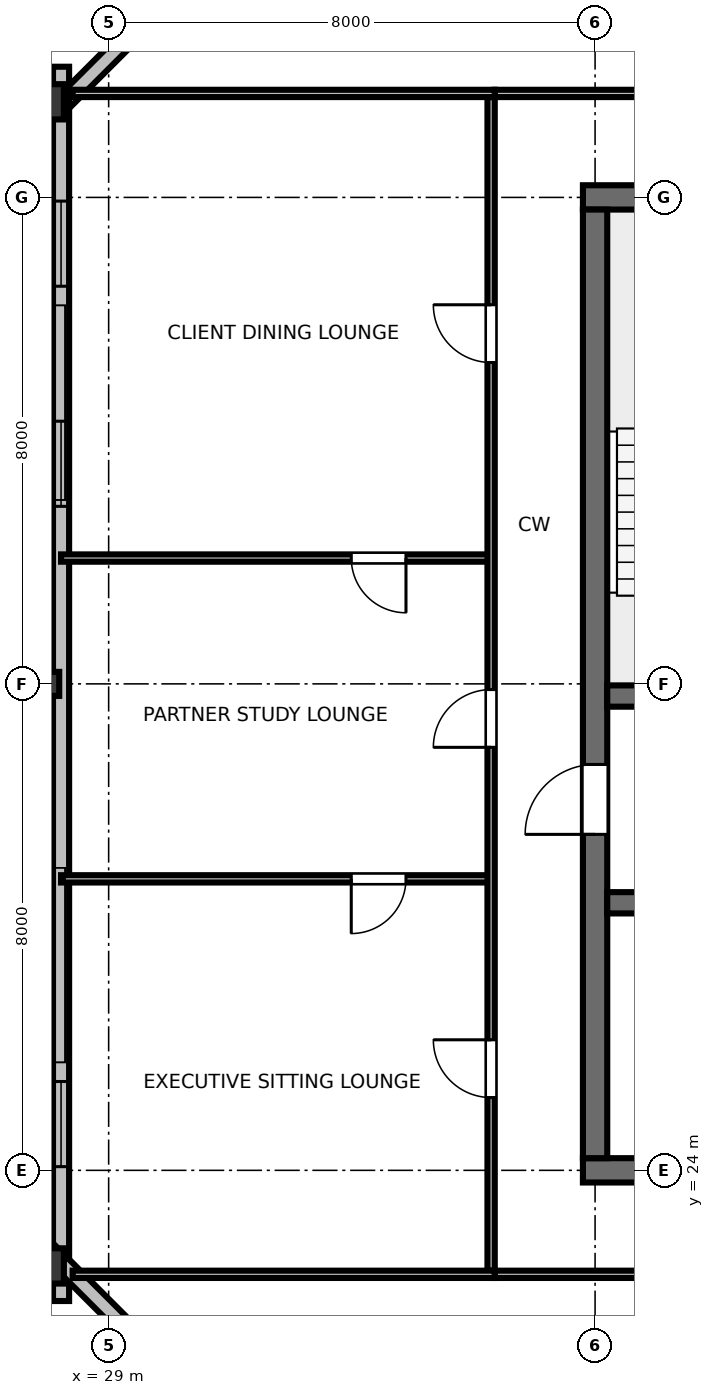
"""IFC4 building model, lengths in metres.
Left out: names, types, materials, properties, quantities, classifications, styles, units other than length and angle.
Written with IfcOpenShell. Run it as: python <this file> out.ifc"""

import sys

from ifc_helpers import new_model, si_unit, direction, frame, frame_2d, origin, origin_2d, place, context, subcontext, project, spatial, rectangle, hollow_rectangle, i_section, extrude, element, fill, save


model = new_model("IFC4")
c1 = context("Model", 3, precision=1e-05, world=origin(), true_north=direction((0.0, 1.0)))
c2 = subcontext(c1, "Body", "Model", "MODEL_VIEW")
j1 = project(units=[si_unit("LENGTHUNIT", "METRE"), si_unit("PLANEANGLEUNIT", "RADIAN")], contexts=[c1])
p1 = place(None, origin())
s1 = spatial("IfcSite", under=j1, at=p1, CompositionType="ELEMENT")
p2 = place(p1, origin())
s2 = spatial("IfcBuilding", under=s1, at=p2, CompositionType="ELEMENT")
p3 = place(p2, frame((0.0, 0.0, 268.2)))
s3 = spatial("IfcBuildingStorey", under=s2, at=p3, CompositionType="ELEMENT", Elevation=268.2)
p4 = place(p3, frame((36.8, 24.0, 0.0), z_axis=(0.0, 0.0, 1.0), x_axis=(1.0, 0.0, 0.0)))
e1 = element("IfcWall", 1, at=p4, inside=s3, PredefinedType="SHEAR", context=c2, shape_type="SweptSolid", body=[
    extrude(rectangle(XDim=18.4, YDim=0.4, at=frame_2d((9.2, 0.0))), origin(), (0.0, 0.0, 1.0), 3.36),
])
p5 = place(p4, frame((13.4, 0.0, 0.0)))
e2 = element("IfcOpeningElement", 2, at=p5, cuts=e1, PredefinedType="OPENING", context=c2, shape_type="SweptSolid", body=[
    extrude(rectangle(XDim=1.6, YDim=2.15, at=frame_2d((0.8, 1.075))), frame((0.0, 0.21, 0.0), z_axis=(0.0, -1.0, 0.0), x_axis=(1.0, 0.0, 0.0)), (0.0, 0.0, 1.0), 0.42),
])
p6 = place(p3, frame((36.8, 40.0, 0.0), z_axis=(0.0, 0.0, 1.0), x_axis=(1.0, 0.0, 0.0)))
e3 = element("IfcWall", 3, at=p6, inside=s3, PredefinedType="SHEAR", context=c2, shape_type="SweptSolid", body=[
    extrude(rectangle(XDim=18.4, YDim=0.4, at=frame_2d((9.2, 0.0))), origin(), (0.0, 0.0, 1.0), 3.36),
])
p7 = place(p6, frame((10.5, 0.0, 0.0)))
e4 = element("IfcOpeningElement", 4, at=p7, cuts=e3, PredefinedType="OPENING", context=c2, shape_type="SweptSolid", body=[
    extrude(rectangle(XDim=1.0, YDim=2.15, at=frame_2d((0.5, 1.075))), frame((0.0, 0.21, 0.0), z_axis=(0.0, -1.0, 0.0), x_axis=(1.0, 0.0, 0.0)), (0.0, 0.0, 1.0), 0.42),
])
p8 = place(p3, frame((37.0, 24.2, 0.0), z_axis=(0.0, 0.0, 1.0), x_axis=(0.0, 1.0, 0.0)))
e5 = element("IfcWall", 5, at=p8, inside=s3, PredefinedType="SHEAR", context=c2, shape_type="SweptSolid", body=[
    extrude(rectangle(XDim=15.6, YDim=0.4, at=frame_2d((7.8, 0.0))), origin(), (0.0, 0.0, 1.0), 3.36),
])
p9 = place(p8, frame((5.325, 0.0, 0.0)))
e6 = element("IfcOpeningElement", 6, at=p9, cuts=e5, PredefinedType="OPENING", context=c2, shape_type="SweptSolid", body=[
    extrude(rectangle(XDim=1.15, YDim=2.15, at=frame_2d((0.575, 1.075))), frame((0.0, 0.21, 0.0), z_axis=(0.0, -1.0, 0.0), x_axis=(1.0, 0.0, 0.0)), (0.0, 0.0, 1.0), 0.42),
])
p10 = place(p3, frame((37.2, 31.8, 0.0), z_axis=(0.0, 0.0, 1.0), x_axis=(1.0, 0.0, 0.0)))
e7 = element("IfcWall", 7, at=p10, inside=s3, PredefinedType="SHEAR", context=c2, shape_type="SweptSolid", body=[
    extrude(rectangle(XDim=17.6, YDim=0.35, at=frame_2d((8.8, 0.0))), origin(), (0.0, 0.0, 1.0), 3.36),
])
p11 = place(p10, frame((0.85, 0.0, 0.0)))
e8 = element("IfcOpeningElement", 8, at=p11, cuts=e7, PredefinedType="OPENING", context=c2, shape_type="SweptSolid", body=[
    extrude(rectangle(XDim=1.1, YDim=2.15, at=frame_2d((0.55, 1.075))), frame((0.0, 0.185, 0.0), z_axis=(0.0, -1.0, 0.0), x_axis=(1.0, 0.0, 0.0)), (0.0, 0.0, 1.0), 0.37),
])
p12 = place(p10, frame((14.75, 0.0, 0.0)))
e9 = element("IfcOpeningElement", 9, at=p12, cuts=e7, PredefinedType="OPENING", context=c2, shape_type="SweptSolid", body=[
    extrude(rectangle(XDim=1.1, YDim=2.15, at=frame_2d((0.55, 1.075))), frame((0.0, 0.185, 0.0), z_axis=(0.0, -1.0, 0.0), x_axis=(1.0, 0.0, 0.0)), (0.0, 0.0, 1.0), 0.37),
])
p13 = place(p3, frame((37.2, 28.4, 0.0), z_axis=(0.0, 0.0, 1.0), x_axis=(1.0, 0.0, 0.0)))
e10 = element("IfcWall", 10, at=p13, inside=s3, PredefinedType="SHEAR", context=c2, shape_type="SweptSolid", body=[
    extrude(rectangle(XDim=17.6, YDim=0.35, at=frame_2d((8.8, 0.0))), origin(), (0.0, 0.0, 1.0), 3.36),
])
p14 = place(p3, frame((27.914, 41.572, 0.0), z_axis=(0.177666210098, -0.155370015085, 0.971748360535), x_axis=(-0.731494530151, 0.639695731236, 0.236019329289)))
e11 = element("IfcColumn", 11, at=p14, inside=s3, PredefinedType="COLUMN", context=c2, shape_type="SweptSolid", body=[
    extrude(hollow_rectangle(XDim=0.58, YDim=0.7, WallThickness=0.032, at=origin_2d()), origin(), (0.0, 0.0, 1.0), 3.471),
])
p15 = place(p3, frame((27.997, 32.0, 0.0), z_axis=(0.178954370443, 0.0, 0.98385737447), x_axis=(-0.98385737447, 0.0, 0.178954370443)))
e12 = element("IfcColumn", 12, at=p15, inside=s3, PredefinedType="COLUMN", context=c2, shape_type="SweptSolid", body=[
    extrude(i_section(OverallWidth=0.395, OverallDepth=0.38, WebThickness=0.019, FlangeThickness=0.03, FilletRadius=0.025, at=origin_2d()), origin(), (0.0, 0.0, 1.0), 3.428),
])
p16 = place(p3, frame((27.914, 22.428, 0.0), z_axis=(0.177666210098, 0.155370015085, 0.971748360535), x_axis=(-0.731494530151, -0.639695731236, 0.236019329289)))
e13 = element("IfcColumn", 13, at=p16, inside=s3, PredefinedType="COLUMN", context=c2, shape_type="SweptSolid", body=[
    extrude(hollow_rectangle(XDim=0.58, YDim=0.7, WallThickness=0.032, at=origin_2d()), origin(), (0.0, 0.0, 1.0), 3.471),
])
p17 = place(p3, frame((35.53, 48.832, 0.0), z_axis=(0.0, 0.0, 1.0), x_axis=(-0.707106781187, -0.707106781187, 0.0)))
e14 = element("IfcWall", 14, at=p17, inside=s3, PredefinedType="STANDARD", context=c2, shape_type="SweptSolid", body=[
    extrude(rectangle(XDim=10.971, YDim=0.265, at=frame_2d((5.485, 0.0))), origin(), (0.0, 0.0, 1.0), 3.375),
])
p18 = place(p3, frame((28.217, 42.149, 0.0), z_axis=(0.0, 0.0, 1.0), x_axis=(0.0, -1.0, 0.0)))
e15 = element("IfcWall", 15, at=p18, inside=s3, PredefinedType="STANDARD", context=c2, shape_type="SweptSolid", body=[
    extrude(rectangle(XDim=20.298, YDim=0.265, at=frame_2d((10.149, 0.0))), origin(), (0.0, 0.0, 1.0), 2.832),
])
p19 = place(p18, frame((2.21, 0.0, 0.85)))
e16 = element("IfcOpeningElement", 16, at=p19, cuts=e15, PredefinedType="OPENING", context=c2, shape_type="SweptSolid", body=[
    extrude(rectangle(XDim=1.4, YDim=1.2, at=frame_2d((0.7, 0.6))), frame((0.0, 0.142, 0.0), z_axis=(0.0, -1.0, 0.0), x_axis=(1.0, 0.0, 0.0)), (0.0, 0.0, 1.0), 0.285),
])
p20 = place(p18, frame((5.83, 0.0, 0.85)))
e17 = element("IfcOpeningElement", 17, at=p20, cuts=e15, PredefinedType="OPENING", context=c2, shape_type="SweptSolid", body=[
    extrude(rectangle(XDim=1.4, YDim=1.2, at=frame_2d((0.7, 0.6))), frame((0.0, 0.142, 0.0), z_axis=(0.0, -1.0, 0.0), x_axis=(1.0, 0.0, 0.0)), (0.0, 0.0, 1.0), 0.285),
])
p21 = place(p18, frame((16.688, 0.0, 0.85)))
e18 = element("IfcOpeningElement", 18, at=p21, cuts=e15, PredefinedType="OPENING", context=c2, shape_type="SweptSolid", body=[
    extrude(rectangle(XDim=1.4, YDim=1.2, at=frame_2d((0.7, 0.6))), frame((0.0, 0.142, 0.0), z_axis=(0.0, -1.0, 0.0), x_axis=(1.0, 0.0, 0.0)), (0.0, 0.0, 1.0), 0.285),
])
p22 = place(p3, frame((27.772, 22.925, 0.0), z_axis=(0.0, 0.0, 1.0), x_axis=(0.707106781187, -0.707106781187, 0.0)))
e19 = element("IfcWall", 19, at=p22, inside=s3, PredefinedType="STANDARD", context=c2, shape_type="SweptSolid", body=[
    extrude(rectangle(XDim=10.971, YDim=0.265, at=frame_2d((5.485, 0.0))), origin(), (0.0, 0.0, 1.0), 3.375),
])
p23 = place(p3, frame((35.35, 22.29, 0.0), z_axis=(0.0, 0.0, 1.0), x_axis=(1.0, 0.0, 0.0)))
e20 = element("IfcWall", 20, at=p23, inside=s3, PredefinedType="PARTITIONING", context=c2, shape_type="SweptSolid", body=[
    extrude(rectangle(XDim=21.3, YDim=0.12, at=frame_2d((10.65, 0.0))), origin(), (0.0, 0.0, 1.0), 2.655),
])
p24 = place(p23, frame((4.425, 0.0, 0.0)))
e21 = element("IfcOpeningElement", 21, at=p24, cuts=e20, PredefinedType="OPENING", context=c2, shape_type="SweptSolid", body=[
    extrude(rectangle(XDim=0.95, YDim=2.15, at=frame_2d((0.475, 1.075))), frame((0.0, 0.07, 0.0), z_axis=(0.0, -1.0, 0.0), x_axis=(1.0, 0.0, 0.0)), (0.0, 0.0, 1.0), 0.14),
])
p25 = place(p23, frame((13.051, 0.0, 0.0)))
e22 = element("IfcOpeningElement", 22, at=p25, cuts=e20, PredefinedType="OPENING", context=c2, shape_type="SweptSolid", body=[
    extrude(rectangle(XDim=0.95, YDim=2.15, at=frame_2d((0.475, 1.075))), frame((0.0, 0.07, 0.0), z_axis=(0.0, -1.0, 0.0), x_axis=(1.0, 0.0, 0.0)), (0.0, 0.0, 1.0), 0.14),
])
p26 = place(p23, frame((17.811, 0.0, 0.0)))
e23 = element("IfcOpeningElement", 23, at=p26, cuts=e20, PredefinedType="OPENING", context=c2, shape_type="SweptSolid", body=[
    extrude(rectangle(XDim=0.95, YDim=2.15, at=frame_2d((0.475, 1.075))), frame((0.0, 0.07, 0.0), z_axis=(0.0, -1.0, 0.0), x_axis=(1.0, 0.0, 0.0)), (0.0, 0.0, 1.0), 0.14),
])
p27 = place(p3, frame((35.35, 41.71, 0.0), z_axis=(0.0, 0.0, 1.0), x_axis=(1.0, 0.0, 0.0)))
e24 = element("IfcWall", 24, at=p27, inside=s3, PredefinedType="PARTITIONING", context=c2, shape_type="SweptSolid", body=[
    extrude(rectangle(XDim=21.3, YDim=0.12, at=frame_2d((10.65, 0.0))), origin(), (0.0, 0.0, 1.0), 2.655),
])
p28 = place(p27, frame((4.361, 0.0, 0.0)))
e25 = element("IfcOpeningElement", 25, at=p28, cuts=e24, PredefinedType="OPENING", context=c2, shape_type="SweptSolid", body=[
    extrude(rectangle(XDim=0.95, YDim=2.15, at=frame_2d((0.475, 1.075))), frame((0.0, 0.07, 0.0), z_axis=(0.0, -1.0, 0.0), x_axis=(1.0, 0.0, 0.0)), (0.0, 0.0, 1.0), 0.14),
])
p29 = place(p27, frame((15.925, 0.0, 0.0)))
e26 = element("IfcOpeningElement", 26, at=p29, cuts=e24, PredefinedType="OPENING", context=c2, shape_type="SweptSolid", body=[
    extrude(rectangle(XDim=0.95, YDim=2.15, at=frame_2d((0.475, 1.075))), frame((0.0, 0.07, 0.0), z_axis=(0.0, -1.0, 0.0), x_axis=(1.0, 0.0, 0.0)), (0.0, 0.0, 1.0), 0.14),
])
p30 = place(p3, frame((35.29, 28.794, 0.0), z_axis=(0.0, 0.0, 1.0), x_axis=(-1.0, 0.0, 0.0)))
e27 = element("IfcWall", 27, at=p30, inside=s3, PredefinedType="PARTITIONING", context=c2, shape_type="SweptSolid", body=[
    extrude(rectangle(XDim=7.073, YDim=0.12, at=frame_2d((3.536, 0.0))), origin(), (0.0, 0.0, 1.0), 2.655),
])
p31 = place(p30, frame((1.4, 0.0, 0.0)))
e28 = element("IfcOpeningElement", 28, at=p31, cuts=e27, PredefinedType="OPENING", context=c2, shape_type="SweptSolid", body=[
    extrude(rectangle(XDim=0.9, YDim=2.15, at=frame_2d((0.45, 1.075))), frame((0.0, 0.07, 0.0), z_axis=(0.0, -1.0, 0.0), x_axis=(1.0, 0.0, 0.0)), (0.0, 0.0, 1.0), 0.14),
])
p32 = place(p3, frame((35.29, 34.069, 0.0), z_axis=(0.0, 0.0, 1.0), x_axis=(-1.0, 0.0, 0.0)))
e29 = element("IfcWall", 29, at=p32, inside=s3, PredefinedType="PARTITIONING", context=c2, shape_type="SweptSolid", body=[
    extrude(rectangle(XDim=7.073, YDim=0.12, at=frame_2d((3.536, 0.0))), origin(), (0.0, 0.0, 1.0), 2.655),
])
p33 = place(p32, frame((1.4, 0.0, 0.0)))
e30 = element("IfcOpeningElement", 30, at=p33, cuts=e29, PredefinedType="OPENING", context=c2, shape_type="SweptSolid", body=[
    extrude(rectangle(XDim=0.9, YDim=2.15, at=frame_2d((0.45, 1.075))), frame((0.0, 0.07, 0.0), z_axis=(0.0, -1.0, 0.0), x_axis=(1.0, 0.0, 0.0)), (0.0, 0.0, 1.0), 0.14),
])
p34 = place(p3, frame((35.29, 22.35, 0.0), z_axis=(0.0, 0.0, 1.0), x_axis=(0.0, 1.0, 0.0)))
e31 = element("IfcWall", 31, at=p34, inside=s3, PredefinedType="PARTITIONING", context=c2, shape_type="SweptSolid", body=[
    extrude(rectangle(XDim=19.3, YDim=0.12, at=frame_2d((9.65, 0.0))), origin(), (0.0, 0.0, 1.0), 2.655),
])
p35 = place(p34, frame((2.847, 0.0, 0.0)))
e32 = element("IfcOpeningElement", 32, at=p35, cuts=e31, PredefinedType="OPENING", context=c2, shape_type="SweptSolid", body=[
    extrude(rectangle(XDim=0.95, YDim=2.15, at=frame_2d((0.475, 1.075))), frame((0.0, 0.07, 0.0), z_axis=(0.0, -1.0, 0.0), x_axis=(1.0, 0.0, 0.0)), (0.0, 0.0, 1.0), 0.14),
])
p36 = place(p34, frame((8.606, 0.0, 0.0)))
e33 = element("IfcOpeningElement", 33, at=p36, cuts=e31, PredefinedType="OPENING", context=c2, shape_type="SweptSolid", body=[
    extrude(rectangle(XDim=0.95, YDim=2.15, at=frame_2d((0.475, 1.075))), frame((0.0, 0.07, 0.0), z_axis=(0.0, -1.0, 0.0), x_axis=(1.0, 0.0, 0.0)), (0.0, 0.0, 1.0), 0.14),
])
p37 = place(p34, frame((14.935, 0.0, 0.0)))
e34 = element("IfcOpeningElement", 34, at=p37, cuts=e31, PredefinedType="OPENING", context=c2, shape_type="SweptSolid", body=[
    extrude(rectangle(XDim=0.95, YDim=2.15, at=frame_2d((0.475, 1.075))), frame((0.0, 0.07, 0.0), z_axis=(0.0, -1.0, 0.0), x_axis=(1.0, 0.0, 0.0)), (0.0, 0.0, 1.0), 0.14),
])
for number, where, z_axis, x_axis in (
    (35, (35.35, 22.29, 0.0), (0.0, 0.0, 1.0), (-1.0, 0.0, 0.0)),
    (36, (35.35, 41.71, 0.0), (0.0, 0.0, 1.0), (-1.0, 0.0, 0.0)),
):
    element("IfcWall", number, at=place(p3, frame(where, z_axis=z_axis, x_axis=x_axis)), inside=s3, PredefinedType="PARTITIONING", context=c2, shape_type="SweptSolid", body=[
        extrude(rectangle(XDim=6.942, YDim=0.12, at=frame_2d((3.471, 0.0))), origin(), (0.0, 0.0, 1.0), 2.655),
    ])
p38 = place(p19, origin())
e37 = element("IfcWindow", 37, at=p38, inside=s3, PartitioningType="SINGLE_PANEL", PredefinedType="WINDOW", context=c2, shape_type="SweptSolid", body=[
    extrude(rectangle(XDim=1.4, YDim=1.2, at=frame_2d((0.7, 0.6))), frame((0.0, 0.03, 0.0), z_axis=(0.0, -1.0, 0.0), x_axis=(1.0, 0.0, 0.0)), (0.0, 0.0, 1.0), 0.06),
])
fill(e16, e37)
p39 = place(p20, origin())
e38 = element("IfcWindow", 38, at=p39, inside=s3, PartitioningType="SINGLE_PANEL", PredefinedType="WINDOW", context=c2, shape_type="SweptSolid", body=[
    extrude(rectangle(XDim=1.4, YDim=1.2, at=frame_2d((0.7, 0.6))), frame((0.0, 0.03, 0.0), z_axis=(0.0, -1.0, 0.0), x_axis=(1.0, 0.0, 0.0)), (0.0, 0.0, 1.0), 0.06),
])
fill(e17, e38)
p40 = place(p21, origin())
e39 = element("IfcWindow", 39, at=p40, inside=s3, PartitioningType="SINGLE_PANEL", PredefinedType="WINDOW", context=c2, shape_type="SweptSolid", body=[
    extrude(rectangle(XDim=1.4, YDim=1.2, at=frame_2d((0.7, 0.6))), frame((0.0, 0.03, 0.0), z_axis=(0.0, -1.0, 0.0), x_axis=(1.0, 0.0, 0.0)), (0.0, 0.0, 1.0), 0.06),
])
fill(e18, e39)
p41 = place(p9, origin())
e40 = element("IfcDoor", 40, at=p41, inside=s3, OperationType="SINGLE_SWING_LEFT", PredefinedType="DOOR", context=c2, shape_type="SweptSolid", body=[
    extrude(rectangle(XDim=1.15, YDim=2.15, at=frame_2d((0.575, 1.075))), frame((0.0, 0.025, 0.0), z_axis=(0.0, -1.0, 0.0), x_axis=(1.0, 0.0, 0.0)), (0.0, 0.0, 1.0), 0.05),
])
fill(e6, e40)
p42 = place(p31, origin())
e41 = element("IfcDoor", 41, at=p42, inside=s3, OperationType="SINGLE_SWING_RIGHT", PredefinedType="DOOR", context=c2, shape_type="SweptSolid", body=[
    extrude(rectangle(XDim=0.9, YDim=2.15, at=frame_2d((0.45, 1.075))), frame((0.0, 0.025, 0.0), z_axis=(0.0, -1.0, 0.0), x_axis=(1.0, 0.0, 0.0)), (0.0, 0.0, 1.0), 0.05),
])
fill(e28, e41)
p43 = place(p33, origin())
e42 = element("IfcDoor", 42, at=p43, inside=s3, OperationType="SINGLE_SWING_LEFT", PredefinedType="DOOR", context=c2, shape_type="SweptSolid", body=[
    extrude(rectangle(XDim=0.9, YDim=2.15, at=frame_2d((0.45, 1.075))), frame((0.0, 0.025, 0.0), z_axis=(0.0, -1.0, 0.0), x_axis=(1.0, 0.0, 0.0)), (0.0, 0.0, 1.0), 0.05),
])
fill(e30, e42)
p44 = place(p35, origin())
e43 = element("IfcDoor", 43, at=p44, inside=s3, OperationType="SINGLE_SWING_RIGHT", PredefinedType="DOOR", context=c2, shape_type="SweptSolid", body=[
    extrude(rectangle(XDim=0.95, YDim=2.15, at=frame_2d((0.475, 1.075))), frame((0.0, 0.025, 0.0), z_axis=(0.0, -1.0, 0.0), x_axis=(1.0, 0.0, 0.0)), (0.0, 0.0, 1.0), 0.05),
])
fill(e32, e43)
p45 = place(p36, origin())
e44 = element("IfcDoor", 44, at=p45, inside=s3, OperationType="SINGLE_SWING_LEFT", PredefinedType="DOOR", context=c2, shape_type="SweptSolid", body=[
    extrude(rectangle(XDim=0.95, YDim=2.15, at=frame_2d((0.475, 1.075))), frame((0.0, 0.025, 0.0), z_axis=(0.0, -1.0, 0.0), x_axis=(1.0, 0.0, 0.0)), (0.0, 0.0, 1.0), 0.05),
])
fill(e33, e44)
p46 = place(p37, origin())
e45 = element("IfcDoor", 45, at=p46, inside=s3, OperationType="SINGLE_SWING_RIGHT", PredefinedType="DOOR", context=c2, shape_type="SweptSolid", body=[
    extrude(rectangle(XDim=0.95, YDim=2.15, at=frame_2d((0.475, 1.075))), frame((0.0, 0.025, 0.0), z_axis=(0.0, -1.0, 0.0), x_axis=(1.0, 0.0, 0.0)), (0.0, 0.0, 1.0), 0.05),
])
fill(e34, e45)
save(model, sys.argv[1])
